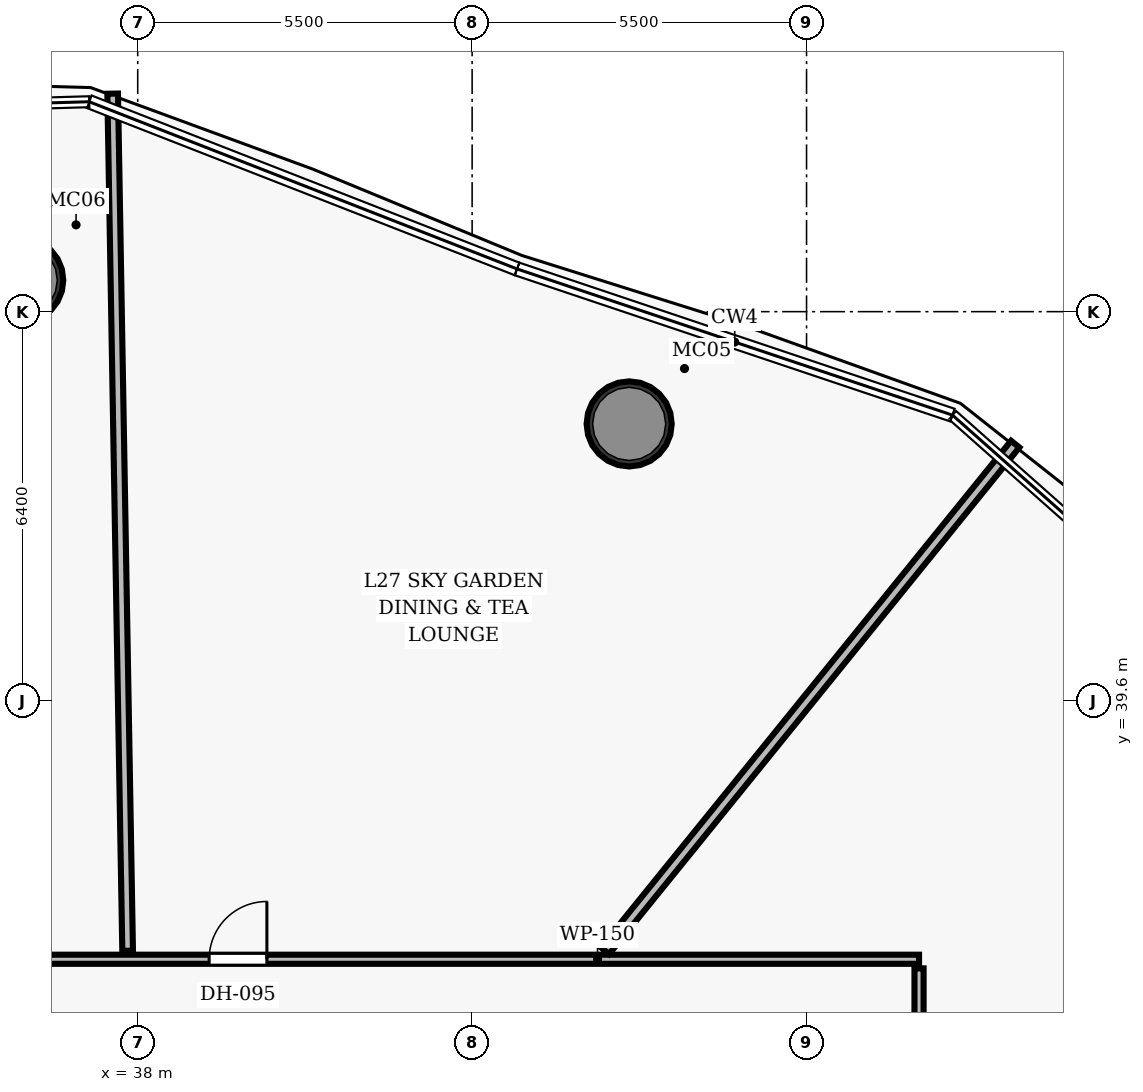
"""IFC4 building model, lengths in metres.
Left out: names, types, materials, properties, quantities, classifications, styles, units other than length and angle.
Written with IfcOpenShell. Run it as: python <this file> out.ifc"""

import sys

from ifc_helpers import new_model, si_unit, direction, frame, frame_2d, origin, origin_2d, place, context, subcontext, project, spatial, rectangle, hollow_circle, extrude, element, fill, save


model = new_model("IFC4")
c1 = context("Model", 3, precision=1e-05, world=origin(), true_north=direction((0.0, 1.0)))
c2 = subcontext(c1, "Body", "Model", "MODEL_VIEW")
j1 = project(units=[si_unit("LENGTHUNIT", "METRE"), si_unit("PLANEANGLEUNIT", "RADIAN")], contexts=[c1])
p1 = place(None, origin())
s1 = spatial("IfcSite", under=j1, at=p1, CompositionType="ELEMENT")
p2 = place(p1, origin())
s2 = spatial("IfcBuilding", under=s1, at=p2, CompositionType="ELEMENT")
p3 = place(p2, frame((0.0, 0.0, 113.3)))
s3 = spatial("IfcBuildingStorey", under=s2, at=p3, CompositionType="ELEMENT", Elevation=113.3)
for number, where, z_axis, x_axis in (
    (1, (46.083, 44.154, 0.0), (0.0, 0.0, 1.0), (1.0, 0.0, 0.0)),
    (2, (36.076, 46.517, 0.0), (0.0, 0.0, 1.0), (1.0, 0.0, 0.0)),
):
    element("IfcColumn", number, at=place(p3, frame(where, z_axis=z_axis, x_axis=x_axis)), inside=s3, PredefinedType="COLUMN", context=c2, shape_type="SweptSolid", body=[
        extrude(hollow_circle(Radius=0.7, WallThickness=0.055, at=origin_2d()), origin(), (0.0, 0.0, 1.0), 3.5),
    ])
p4 = place(p3, frame((24.85, 35.35, 0.0), z_axis=(0.0, 0.0, 1.0), x_axis=(1.0, 0.0, 0.0)))
e3 = element("IfcWall", 3, at=p4, inside=s3, PredefinedType="PARTITIONING", context=c2, shape_type="SweptSolid", body=[
    extrude(rectangle(XDim=26.0, YDim=0.15, at=frame_2d((13.0, 0.0))), origin(), (0.0, 0.0, 1.0), 2.675),
])
p5 = place(p4, frame((14.325, 0.0, 0.0)))
e4 = element("IfcOpeningElement", 4, at=p5, cuts=e3, PredefinedType="OPENING", context=c2, shape_type="SweptSolid", body=[
    extrude(rectangle(XDim=0.95, YDim=2.15, at=frame_2d((0.475, 1.075))), frame((0.0, 0.085, 0.0), z_axis=(0.0, -1.0, 0.0), x_axis=(1.0, 0.0, 0.0)), (0.0, 0.0, 1.0), 0.17),
])
p6 = place(p4, frame((7.162, 0.0, 0.0)))
e5 = element("IfcOpeningElement", 5, at=p6, cuts=e3, PredefinedType="OPENING", context=c2, shape_type="SweptSolid", body=[
    extrude(rectangle(XDim=0.95, YDim=2.15, at=frame_2d((0.475, 1.075))), frame((0.0, 0.085, 0.0), z_axis=(0.0, -1.0, 0.0), x_axis=(1.0, 0.0, 0.0)), (0.0, 0.0, 1.0), 0.17),
])
p7 = place(p3, frame((50.85, 27.08, 0.0), z_axis=(0.0, 0.0, 1.0), x_axis=(0.0, 1.0, 0.0)))
e6 = element("IfcWall", 6, at=p7, inside=s3, PredefinedType="PARTITIONING", context=c2, shape_type="SweptSolid", body=[
    extrude(rectangle(XDim=8.12, YDim=0.15, at=frame_2d((4.06, 0.0))), origin(), (0.0, 0.0, 1.0), 2.675),
])
p8 = place(p7, frame((2.414, 0.0, 0.0)))
e7 = element("IfcOpeningElement", 7, at=p8, cuts=e6, PredefinedType="OPENING", context=c2, shape_type="SweptSolid", body=[
    extrude(rectangle(XDim=0.95, YDim=2.15, at=frame_2d((0.475, 1.075))), frame((0.0, 0.085, 0.0), z_axis=(0.0, -1.0, 0.0), x_axis=(1.0, 0.0, 0.0)), (0.0, 0.0, 1.0), 0.17),
])
p9 = place(p3, frame((45.685, 35.49, 0.0), z_axis=(0.0, 0.0, 1.0), x_axis=(0.629313518397, 0.777151526771, 0.0)))
e8 = element("IfcWall", 8, at=p9, inside=s3, PredefinedType="PARTITIONING", context=c2, shape_type="SweptSolid", body=[
    extrude(rectangle(XDim=10.721, YDim=0.175, at=frame_2d((5.36, 0.0))), origin(), (0.0, 0.0, 1.0), 2.675),
])
p10 = place(p3, frame((37.834, 35.49, 0.0), z_axis=(0.0, 0.0, 1.0), x_axis=(-0.017456722222, 0.999847619815, 0.0)))
e9 = element("IfcWall", 9, at=p10, inside=s3, PredefinedType="PARTITIONING", context=c2, shape_type="SweptSolid", body=[
    extrude(rectangle(XDim=14.097, YDim=0.175, at=frame_2d((7.049, 0.0))), origin(), (0.0, 0.0, 1.0), 2.675),
])
p11 = place(p5, origin())
e10 = element("IfcDoor", 10, at=p11, inside=s3, OperationType="SINGLE_SWING_RIGHT", PredefinedType="DOOR", context=c2, shape_type="SweptSolid", body=[
    extrude(rectangle(XDim=0.95, YDim=2.15, at=frame_2d((0.475, 1.075))), frame((0.0, 0.025, 0.0), z_axis=(0.0, -1.0, 0.0), x_axis=(1.0, 0.0, 0.0)), (0.0, 0.0, 1.0), 0.05),
])
fill(e4, e10)
save(model, sys.argv[1])
